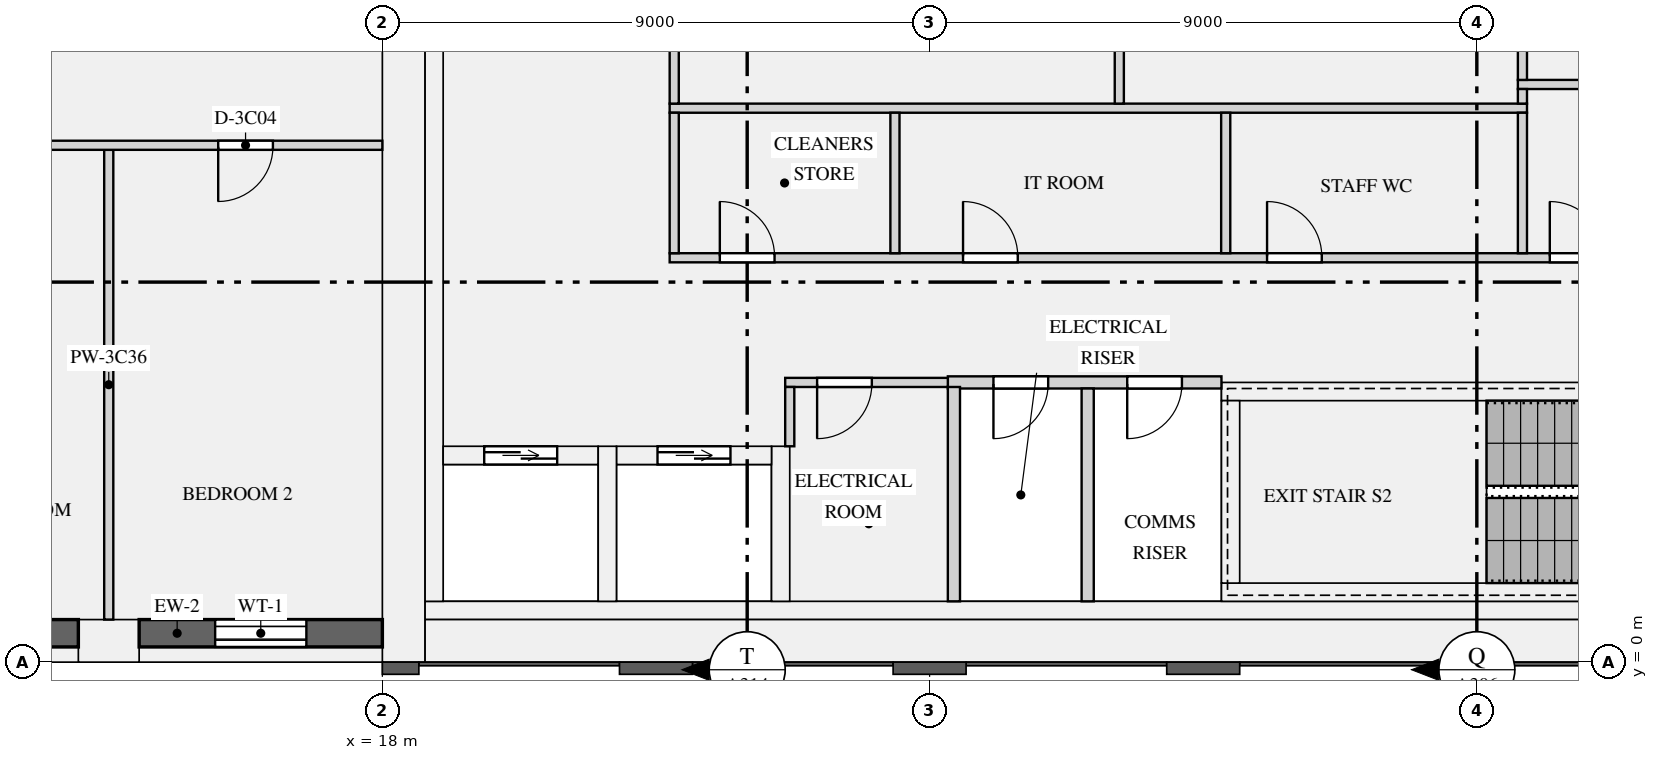
"""IFC4 building model, lengths in metres.
Left out: names, types, materials, properties, quantities, classifications, styles, units other than length and angle.
Written with IfcOpenShell. Run it as: python <this file> out.ifc"""

import sys

from ifc_helpers import new_model, si_unit, direction, frame, frame_2d, origin, origin_2d, place, context, subcontext, project, spatial, rectangle, extrude, element, fill, save


model = new_model("IFC4")
c1 = context("Model", 3, precision=1e-05, world=origin(), true_north=direction((0.0, 1.0)))
c2 = subcontext(c1, "Body", "Model", "MODEL_VIEW")
j1 = project(units=[si_unit("LENGTHUNIT", "METRE"), si_unit("PLANEANGLEUNIT", "RADIAN")], contexts=[c1])
p1 = place(None, origin())
s1 = spatial("IfcSite", under=j1, at=p1, CompositionType="ELEMENT")
p2 = place(p1, origin())
s2 = spatial("IfcBuilding", under=s1, at=p2, CompositionType="ELEMENT")
p3 = place(p2, frame((0.0, 0.0, 160.2)))
s3 = spatial("IfcBuildingStorey", under=s2, at=p3, CompositionType="ELEMENT", Elevation=160.2)
p4 = place(p3, frame((13.5, 0.35, 0.0), z_axis=(0.0, 0.0, 1.0), x_axis=(1.0, 0.0, 0.0)))
e1 = element("IfcColumn", 1, at=p4, inside=s3, PredefinedType="USERDEFINED", context=c2, shape_type="SweptSolid", body=[
    extrude(rectangle(XDim=1.0, YDim=0.7, at=origin_2d()), origin(), (0.0, 0.0, 1.0), 3.15),
])
p5 = place(p3, frame((18.35, 0.0, 0.0), z_axis=(0.0, 0.0, 1.0), x_axis=(0.0, 1.0, 0.0)))
e2 = element("IfcWall", 2, at=p5, inside=s3, PredefinedType="SHEAR", context=c2, shape_type="SweptSolid", body=[
    extrude(rectangle(XDim=12.5, YDim=0.7, at=frame_2d((6.25, 0.0))), origin(), (0.0, 0.0, 1.0), 3.15),
])
p6 = place(p3, frame((18.7, 0.35, 0.0), z_axis=(0.0, 0.0, 1.0), x_axis=(1.0, 0.0, 0.0)))
e3 = element("IfcWall", 3, at=p6, inside=s3, PredefinedType="SHEAR", context=c2, shape_type="SweptSolid", body=[
    extrude(rectangle(XDim=34.6, YDim=0.7, at=frame_2d((17.3, 0.0))), origin(), (0.0, 0.0, 1.0), 3.15),
])
p7 = place(p3, frame((18.85, 1.0, 0.0), z_axis=(0.0, 0.0, 1.0), x_axis=(0.0, 1.0, 0.0)))
e4 = element("IfcWall", 4, at=p7, inside=s3, PredefinedType="SHEAR", context=c2, shape_type="SweptSolid", body=[
    extrude(rectangle(XDim=10.9, YDim=0.3, at=frame_2d((5.45, 0.0))), origin(), (0.0, 0.0, 1.0), 3.15),
])
p8 = place(p3, frame((18.7, 0.85, 0.0), z_axis=(0.0, 0.0, 1.0), x_axis=(1.0, 0.0, 0.0)))
e5 = element("IfcWall", 5, at=p8, inside=s3, PredefinedType="SHEAR", context=c2, shape_type="SweptSolid", body=[
    extrude(rectangle(XDim=34.6, YDim=0.3, at=frame_2d((17.3, 0.0))), origin(), (0.0, 0.0, 1.0), 3.15),
])
p9 = place(p3, frame((19.0, 3.4, 0.0), z_axis=(0.0, 0.0, 1.0), x_axis=(1.0, 0.0, 0.0)))
e6 = element("IfcWall", 6, at=p9, inside=s3, PredefinedType="SHEAR", context=c2, shape_type="SweptSolid", body=[
    extrude(rectangle(XDim=2.55, YDim=0.3, at=frame_2d((1.275, 0.0))), origin(), (0.0, 0.0, 1.0), 3.15),
])
p10 = place(p9, frame((0.675, 0.0, 0.0)))
e7 = element("IfcOpeningElement", 7, at=p10, cuts=e6, PredefinedType="OPENING", context=c2, shape_type="SweptSolid", body=[
    extrude(rectangle(XDim=1.2, YDim=2.1, at=frame_2d((0.6, 1.05))), frame((0.0, 0.16, 0.0), z_axis=(0.0, -1.0, 0.0), x_axis=(1.0, 0.0, 0.0)), (0.0, 0.0, 1.0), 0.32),
])
p11 = place(p3, frame((21.85, 3.4, 0.0), z_axis=(0.0, 0.0, 1.0), x_axis=(1.0, 0.0, 0.0)))
e8 = element("IfcWall", 8, at=p11, inside=s3, PredefinedType="SHEAR", context=c2, shape_type="SweptSolid", body=[
    extrude(rectangle(XDim=2.55, YDim=0.3, at=frame_2d((1.275, 0.0))), origin(), (0.0, 0.0, 1.0), 3.15),
])
p12 = place(p11, frame((0.675, 0.0, 0.0)))
e9 = element("IfcOpeningElement", 9, at=p12, cuts=e8, PredefinedType="OPENING", context=c2, shape_type="SweptSolid", body=[
    extrude(rectangle(XDim=1.2, YDim=2.1, at=frame_2d((0.6, 1.05))), frame((0.0, 0.16, 0.0), z_axis=(0.0, -1.0, 0.0), x_axis=(1.0, 0.0, 0.0)), (0.0, 0.0, 1.0), 0.32),
])
for number, where, z_axis, x_axis in (
    (10, (21.7, 1.0, 0.0), (0.0, 0.0, 1.0), (0.0, 1.0, 0.0)),
    (11, (24.55, 1.0, 0.0), (0.0, 0.0, 1.0), (0.0, 1.0, 0.0)),
):
    element("IfcWall", number, at=place(p3, frame(where, z_axis=z_axis, x_axis=x_axis)), inside=s3, PredefinedType="SHEAR", context=c2, shape_type="SweptSolid", body=[
        extrude(rectangle(XDim=2.55, YDim=0.3, at=frame_2d((1.275, 0.0))), origin(), (0.0, 0.0, 1.0), 3.15),
    ])
p13 = place(p3, frame((31.8, 1.15, 0.0), z_axis=(0.0, 0.0, 1.0), x_axis=(1.0, 0.0, 0.0)))
e12 = element("IfcWall", 12, at=p13, inside=s3, PredefinedType="SHEAR", context=c2, shape_type="SweptSolid", body=[
    extrude(rectangle(XDim=8.4, YDim=0.3, at=frame_2d((4.2, 0.0))), origin(), (0.0, 0.0, 1.0), 3.15),
])
p14 = place(p3, frame((31.8, 4.45, 0.0), z_axis=(0.0, 0.0, 1.0), x_axis=(1.0, 0.0, 0.0)))
e13 = element("IfcWall", 13, at=p14, inside=s3, PredefinedType="SHEAR", context=c2, shape_type="SweptSolid", body=[
    extrude(rectangle(XDim=8.4, YDim=0.3, at=frame_2d((4.2, 0.0))), origin(), (0.0, 0.0, 1.0), 3.15),
])
p15 = place(p14, frame((6.8, 0.0, 0.0)))
e14 = element("IfcOpeningElement", 14, at=p15, cuts=e13, PredefinedType="OPENING", context=c2, shape_type="SweptSolid", body=[
    extrude(rectangle(XDim=1.1, YDim=2.1, at=frame_2d((0.55, 1.05))), frame((0.0, 0.16, 0.0), z_axis=(0.0, -1.0, 0.0), x_axis=(1.0, 0.0, 0.0)), (0.0, 0.0, 1.0), 0.32),
])
p16 = place(p3, frame((31.95, 1.3, 0.0), z_axis=(0.0, 0.0, 1.0), x_axis=(0.0, 1.0, 0.0)))
e15 = element("IfcWall", 15, at=p16, inside=s3, PredefinedType="SHEAR", context=c2, shape_type="SweptSolid", body=[
    extrude(rectangle(XDim=3.0, YDim=0.3, at=frame_2d((1.5, 0.0))), origin(), (0.0, 0.0, 1.0), 3.15),
])
p17 = place(p3, frame((10.0, 0.475, 0.9), z_axis=(0.0, 0.0, 1.0), x_axis=(1.0, 0.0, 0.0)))
e16 = element("IfcWall", 16, at=p17, inside=s3, PredefinedType="SOLIDWALL", context=c2, shape_type="SweptSolid", body=[
    extrude(rectangle(XDim=3.0, YDim=0.45, at=frame_2d((1.5, 0.0))), origin(), (0.0, 0.0, 1.0), 1.93),
])
p18 = place(p17, frame((0.75, 0.0, 0.15)))
e17 = element("IfcOpeningElement", 17, at=p18, cuts=e16, PredefinedType="OPENING", context=c2, shape_type="SweptSolid", body=[
    extrude(rectangle(XDim=1.5, YDim=1.5, at=frame_2d((0.75, 0.75))), frame((0.0, 0.235, 0.0), z_axis=(0.0, -1.0, 0.0), x_axis=(1.0, 0.0, 0.0)), (0.0, 0.0, 1.0), 0.47),
])
p19 = place(p3, frame((14.0, 0.475, 0.9), z_axis=(0.0, 0.0, 1.0), x_axis=(1.0, 0.0, 0.0)))
e18 = element("IfcWall", 18, at=p19, inside=s3, PredefinedType="SOLIDWALL", context=c2, shape_type="SweptSolid", body=[
    extrude(rectangle(XDim=4.0, YDim=0.45, at=frame_2d((2.0, 0.0))), origin(), (0.0, 0.0, 1.0), 1.93),
])
p20 = place(p19, frame((1.25, 0.0, 0.15)))
e19 = element("IfcOpeningElement", 19, at=p20, cuts=e18, PredefinedType="OPENING", context=c2, shape_type="SweptSolid", body=[
    extrude(rectangle(XDim=1.5, YDim=1.5, at=frame_2d((0.75, 0.75))), frame((0.0, 0.235, 0.0), z_axis=(0.0, -1.0, 0.0), x_axis=(1.0, 0.0, 0.0)), (0.0, 0.0, 1.0), 0.47),
])
p21 = place(p3, frame((27.3, 4.6, 0.0), z_axis=(0.0, 0.0, 1.0), x_axis=(1.0, 0.0, 0.0)))
e20 = element("IfcWall", 20, at=p21, inside=s3, PredefinedType="PARTITIONING", context=c2, shape_type="SweptSolid", body=[
    extrude(rectangle(XDim=4.5, YDim=0.2, at=frame_2d((2.25, 0.0))), origin(), (0.0, 0.0, 1.0), 2.83),
])
p22 = place(p21, frame((0.75, 0.0, 0.0)))
e21 = element("IfcOpeningElement", 21, at=p22, cuts=e20, PredefinedType="OPENING", context=c2, shape_type="SweptSolid", body=[
    extrude(rectangle(XDim=0.9, YDim=2.1, at=frame_2d((0.45, 1.05))), frame((0.0, 0.11, 0.0), z_axis=(0.0, -1.0, 0.0), x_axis=(1.0, 0.0, 0.0)), (0.0, 0.0, 1.0), 0.22),
])
p23 = place(p21, frame((2.95, 0.0, 0.0)))
e22 = element("IfcOpeningElement", 22, at=p23, cuts=e20, PredefinedType="OPENING", context=c2, shape_type="SweptSolid", body=[
    extrude(rectangle(XDim=0.9, YDim=2.1, at=frame_2d((0.45, 1.05))), frame((0.0, 0.11, 0.0), z_axis=(0.0, -1.0, 0.0), x_axis=(1.0, 0.0, 0.0)), (0.0, 0.0, 1.0), 0.22),
])
p24 = place(p3, frame((24.625, 4.6, 0.0), z_axis=(0.0, 0.0, 1.0), x_axis=(1.0, 0.0, 0.0)))
e23 = element("IfcWall", 23, at=p24, inside=s3, PredefinedType="PARTITIONING", context=c2, shape_type="SweptSolid", body=[
    extrude(rectangle(XDim=2.675, YDim=0.15, at=frame_2d((1.337, 0.0))), origin(), (0.0, 0.0, 1.0), 2.83),
])
p25 = place(p24, frame((0.525, 0.0, 0.0)))
e24 = element("IfcOpeningElement", 24, at=p25, cuts=e23, PredefinedType="OPENING", context=c2, shape_type="SweptSolid", body=[
    extrude(rectangle(XDim=0.9, YDim=2.1, at=frame_2d((0.45, 1.05))), frame((0.0, 0.085, 0.0), z_axis=(0.0, -1.0, 0.0), x_axis=(1.0, 0.0, 0.0)), (0.0, 0.0, 1.0), 0.17),
])
p26 = place(p3, frame((22.725, 6.65, 0.0), z_axis=(0.0, 0.0, 1.0), x_axis=(1.0, 0.0, 0.0)))
e25 = element("IfcWall", 25, at=p26, inside=s3, PredefinedType="PARTITIONING", context=c2, shape_type="SweptSolid", body=[
    extrude(rectangle(XDim=19.8, YDim=0.15, at=frame_2d((9.9, 0.0))), origin(), (0.0, 0.0, 1.0), 2.83),
])
p27 = place(p26, frame((0.825, 0.0, 0.0)))
e26 = element("IfcOpeningElement", 26, at=p27, cuts=e25, PredefinedType="OPENING", context=c2, shape_type="SweptSolid", body=[
    extrude(rectangle(XDim=0.9, YDim=2.1, at=frame_2d((0.45, 1.05))), frame((0.0, 0.085, 0.0), z_axis=(0.0, -1.0, 0.0), x_axis=(1.0, 0.0, 0.0)), (0.0, 0.0, 1.0), 0.17),
])
p28 = place(p26, frame((4.825, 0.0, 0.0)))
e27 = element("IfcOpeningElement", 27, at=p28, cuts=e25, PredefinedType="OPENING", context=c2, shape_type="SweptSolid", body=[
    extrude(rectangle(XDim=0.9, YDim=2.1, at=frame_2d((0.45, 1.05))), frame((0.0, 0.085, 0.0), z_axis=(0.0, -1.0, 0.0), x_axis=(1.0, 0.0, 0.0)), (0.0, 0.0, 1.0), 0.17),
])
p29 = place(p26, frame((9.825, 0.0, 0.0)))
e28 = element("IfcOpeningElement", 28, at=p29, cuts=e25, PredefinedType="OPENING", context=c2, shape_type="SweptSolid", body=[
    extrude(rectangle(XDim=0.9, YDim=2.1, at=frame_2d((0.45, 1.05))), frame((0.0, 0.085, 0.0), z_axis=(0.0, -1.0, 0.0), x_axis=(1.0, 0.0, 0.0)), (0.0, 0.0, 1.0), 0.17),
])
p30 = place(p26, frame((14.475, 0.0, 0.0)))
e29 = element("IfcOpeningElement", 29, at=p30, cuts=e25, PredefinedType="OPENING", context=c2, shape_type="SweptSolid", body=[
    extrude(rectangle(XDim=0.9, YDim=2.1, at=frame_2d((0.45, 1.05))), frame((0.0, 0.085, 0.0), z_axis=(0.0, -1.0, 0.0), x_axis=(1.0, 0.0, 0.0)), (0.0, 0.0, 1.0), 0.17),
])
p31 = place(p3, frame((22.725, 9.11, 0.0), z_axis=(0.0, 0.0, 1.0), x_axis=(1.0, 0.0, 0.0)))
e30 = element("IfcWall", 30, at=p31, inside=s3, PredefinedType="PARTITIONING", context=c2, shape_type="SweptSolid", body=[
    extrude(rectangle(XDim=14.1, YDim=0.15, at=frame_2d((7.05, 0.0))), origin(), (0.0, 0.0, 1.0), 2.83),
])
p32 = place(p3, frame((36.675, 9.5, 0.0), z_axis=(0.0, 0.0, 1.0), x_axis=(1.0, 0.0, 0.0)))
e31 = element("IfcWall", 31, at=p32, inside=s3, PredefinedType="PARTITIONING", context=c2, shape_type="SweptSolid", body=[
    extrude(rectangle(XDim=5.775, YDim=0.15, at=frame_2d((2.887, 0.0))), origin(), (0.0, 0.0, 1.0), 2.83),
])
p33 = place(p3, frame((27.4, 1.0, 0.0), z_axis=(0.0, 0.0, 1.0), x_axis=(0.0, 1.0, 0.0)))
e32 = element("IfcWall", 32, at=p33, inside=s3, PredefinedType="PARTITIONING", context=c2, shape_type="SweptSolid", body=[
    extrude(rectangle(XDim=3.525, YDim=0.2, at=frame_2d((1.762, 0.0))), origin(), (0.0, 0.0, 1.0), 2.83),
])
p34 = place(p3, frame((29.6, 1.0, 0.0), z_axis=(0.0, 0.0, 1.0), x_axis=(0.0, 1.0, 0.0)))
e33 = element("IfcWall", 33, at=p34, inside=s3, PredefinedType="PARTITIONING", context=c2, shape_type="SweptSolid", body=[
    extrude(rectangle(XDim=3.5, YDim=0.2, at=frame_2d((1.75, 0.0))), origin(), (0.0, 0.0, 1.0), 2.83),
])
p35 = place(p3, frame((24.7, 3.55, 0.0), z_axis=(0.0, 0.0, 1.0), x_axis=(0.0, 1.0, 0.0)))
e34 = element("IfcWall", 34, at=p35, inside=s3, PredefinedType="PARTITIONING", context=c2, shape_type="SweptSolid", body=[
    extrude(rectangle(XDim=0.975, YDim=0.15, at=frame_2d((0.487, 0.0))), origin(), (0.0, 0.0, 1.0), 2.83),
])
for number, where, z_axis, x_axis in (
    (35, (22.8, 6.725, 0.0), (0.0, 0.0, 1.0), (0.0, 1.0, 0.0)),
    (36, (26.43, 6.725, 0.0), (0.0, 0.0, 1.0), (0.0, 1.0, 0.0)),
    (37, (31.87, 6.725, 0.0), (0.0, 0.0, 1.0), (0.0, 1.0, 0.0)),
    (38, (36.75, 6.725, 0.0), (0.0, 0.0, 1.0), (0.0, 1.0, 0.0)),
):
    element("IfcWall", number, at=place(p3, frame(where, z_axis=z_axis, x_axis=x_axis)), inside=s3, PredefinedType="PARTITIONING", context=c2, shape_type="SweptSolid", body=[
        extrude(rectangle(XDim=2.31, YDim=0.15, at=frame_2d((1.155, 0.0))), origin(), (0.0, 0.0, 1.0), 2.83),
    ])
for number, where, z_axis, x_axis in (
    (39, (22.8, 9.185, 0.0), (0.0, 0.0, 1.0), (0.0, 1.0, 0.0)),
    (40, (30.12, 9.185, 0.0), (0.0, 0.0, 1.0), (0.0, 1.0, 0.0)),
):
    element("IfcWall", number, at=place(p3, frame(where, z_axis=z_axis, x_axis=x_axis)), inside=s3, PredefinedType="PARTITIONING", context=c2, shape_type="SweptSolid", body=[
        extrude(rectangle(XDim=2.715, YDim=0.15, at=frame_2d((1.357, 0.0))), origin(), (0.0, 0.0, 1.0), 2.83),
    ])
p36 = place(p3, frame((36.75, 9.185, 0.0), z_axis=(0.0, 0.0, 1.0), x_axis=(0.0, 1.0, 0.0)))
e41 = element("IfcWall", 41, at=p36, inside=s3, PredefinedType="PARTITIONING", context=c2, shape_type="SweptSolid", body=[
    extrude(rectangle(XDim=0.24, YDim=0.15, at=frame_2d((0.12, 0.0))), origin(), (0.0, 0.0, 1.0), 2.83),
])
p37 = place(p3, frame((36.75, 9.575, 0.0), z_axis=(0.0, 0.0, 1.0), x_axis=(0.0, 1.0, 0.0)))
e42 = element("IfcWall", 42, at=p37, inside=s3, PredefinedType="PARTITIONING", context=c2, shape_type="SweptSolid", body=[
    extrude(rectangle(XDim=2.325, YDim=0.15, at=frame_2d((1.163, 0.0))), origin(), (0.0, 0.0, 1.0), 2.83),
])
p38 = place(p3, frame((5.2, 8.5, 0.0), z_axis=(0.0, 0.0, 1.0), x_axis=(1.0, 0.0, 0.0)))
e43 = element("IfcWall", 43, at=p38, inside=s3, PredefinedType="PARTITIONING", context=c2, shape_type="SweptSolid", body=[
    extrude(rectangle(XDim=12.8, YDim=0.15, at=frame_2d((6.4, 0.0))), origin(), (0.0, 0.0, 1.0), 2.83),
])
p39 = place(p38, frame((10.1, 0.0, 0.0)))
e44 = element("IfcOpeningElement", 44, at=p39, cuts=e43, PredefinedType="OPENING", context=c2, shape_type="SweptSolid", body=[
    extrude(rectangle(XDim=0.9, YDim=2.1, at=frame_2d((0.45, 1.05))), frame((0.0, 0.085, 0.0), z_axis=(0.0, -1.0, 0.0), x_axis=(1.0, 0.0, 0.0)), (0.0, 0.0, 1.0), 0.17),
])
p40 = place(p38, frame((5.3, 0.0, 0.0)))
e45 = element("IfcOpeningElement", 45, at=p40, cuts=e43, PredefinedType="OPENING", context=c2, shape_type="SweptSolid", body=[
    extrude(rectangle(XDim=1.5, YDim=2.1, at=frame_2d((0.75, 1.05))), frame((0.0, 0.085, 0.0), z_axis=(0.0, -1.0, 0.0), x_axis=(1.0, 0.0, 0.0)), (0.0, 0.0, 1.0), 0.17),
])
p41 = place(p3, frame((13.5, 0.7, 0.0), z_axis=(0.0, 0.0, 1.0), x_axis=(0.0, 1.0, 0.0)))
e46 = element("IfcWall", 46, at=p41, inside=s3, PredefinedType="PARTITIONING", context=c2, shape_type="SweptSolid", body=[
    extrude(rectangle(XDim=7.725, YDim=0.15, at=frame_2d((3.863, 0.0))), origin(), (0.0, 0.0, 1.0), 2.83),
])
p42 = place(p20, origin())
e47 = element("IfcWindow", 47, at=p42, inside=s3, PartitioningType="SINGLE_PANEL", PredefinedType="WINDOW", context=c2, shape_type="SweptSolid", body=[
    extrude(rectangle(XDim=1.5, YDim=1.5, at=frame_2d((0.75, 0.75))), frame((0.0, -0.065, 0.0), z_axis=(0.0, -1.0, 0.0), x_axis=(1.0, 0.0, 0.0)), (0.0, 0.0, 1.0), 0.06),
])
fill(e19, e47)
p43 = place(p10, origin())
e48 = element("IfcDoor", 48, at=p43, inside=s3, OperationType="DOUBLE_DOOR_SLIDING", PredefinedType="DOOR", context=c2, shape_type="SweptSolid", body=[
    extrude(rectangle(XDim=1.2, YDim=2.1, at=frame_2d((0.6, 1.05))), frame((0.0, 0.025, 0.0), z_axis=(0.0, -1.0, 0.0), x_axis=(1.0, 0.0, 0.0)), (0.0, 0.0, 1.0), 0.05),
])
fill(e7, e48)
p44 = place(p12, origin())
e49 = element("IfcDoor", 49, at=p44, inside=s3, OperationType="DOUBLE_DOOR_SLIDING", PredefinedType="DOOR", context=c2, shape_type="SweptSolid", body=[
    extrude(rectangle(XDim=1.2, YDim=2.1, at=frame_2d((0.6, 1.05))), frame((0.0, 0.025, 0.0), z_axis=(0.0, -1.0, 0.0), x_axis=(1.0, 0.0, 0.0)), (0.0, 0.0, 1.0), 0.05),
])
fill(e9, e49)
p45 = place(p25, frame((0.9, 0.0, 0.0), z_axis=(0.0, 0.0, 1.0), x_axis=(-1.0, 0.0, 0.0)))
e50 = element("IfcDoor", 50, at=p45, inside=s3, OperationType="SINGLE_SWING_RIGHT", PredefinedType="DOOR", context=c2, shape_type="SweptSolid", body=[
    extrude(rectangle(XDim=0.9, YDim=2.1, at=frame_2d((0.45, 1.05))), frame((0.0, 0.025, 0.0), z_axis=(0.0, -1.0, 0.0), x_axis=(1.0, 0.0, 0.0)), (0.0, 0.0, 1.0), 0.05),
])
fill(e24, e50)
p46 = place(p27, origin())
e51 = element("IfcDoor", 51, at=p46, inside=s3, OperationType="SINGLE_SWING_LEFT", PredefinedType="DOOR", context=c2, shape_type="SweptSolid", body=[
    extrude(rectangle(XDim=0.9, YDim=2.1, at=frame_2d((0.45, 1.05))), frame((0.0, 0.025, 0.0), z_axis=(0.0, -1.0, 0.0), x_axis=(1.0, 0.0, 0.0)), (0.0, 0.0, 1.0), 0.05),
])
fill(e26, e51)
p47 = place(p28, origin())
e52 = element("IfcDoor", 52, at=p47, inside=s3, OperationType="SINGLE_SWING_LEFT", PredefinedType="DOOR", context=c2, shape_type="SweptSolid", body=[
    extrude(rectangle(XDim=0.9, YDim=2.1, at=frame_2d((0.45, 1.05))), frame((0.0, 0.025, 0.0), z_axis=(0.0, -1.0, 0.0), x_axis=(1.0, 0.0, 0.0)), (0.0, 0.0, 1.0), 0.05),
])
fill(e27, e52)
p48 = place(p29, origin())
e53 = element("IfcDoor", 53, at=p48, inside=s3, OperationType="SINGLE_SWING_LEFT", PredefinedType="DOOR", context=c2, shape_type="SweptSolid", body=[
    extrude(rectangle(XDim=0.9, YDim=2.1, at=frame_2d((0.45, 1.05))), frame((0.0, 0.025, 0.0), z_axis=(0.0, -1.0, 0.0), x_axis=(1.0, 0.0, 0.0)), (0.0, 0.0, 1.0), 0.05),
])
fill(e28, e53)
p49 = place(p30, origin())
e54 = element("IfcDoor", 54, at=p49, inside=s3, OperationType="SINGLE_SWING_LEFT", PredefinedType="DOOR", context=c2, shape_type="SweptSolid", body=[
    extrude(rectangle(XDim=0.9, YDim=2.1, at=frame_2d((0.45, 1.05))), frame((0.0, 0.025, 0.0), z_axis=(0.0, -1.0, 0.0), x_axis=(1.0, 0.0, 0.0)), (0.0, 0.0, 1.0), 0.05),
])
fill(e29, e54)
p50 = place(p22, frame((0.9, 0.0, 0.0), z_axis=(0.0, 0.0, 1.0), x_axis=(-1.0, 0.0, 0.0)))
e55 = element("IfcDoor", 55, at=p50, inside=s3, OperationType="SINGLE_SWING_RIGHT", PredefinedType="DOOR", context=c2, shape_type="SweptSolid", body=[
    extrude(rectangle(XDim=0.9, YDim=2.1, at=frame_2d((0.45, 1.05))), frame((0.0, 0.025, 0.0), z_axis=(0.0, -1.0, 0.0), x_axis=(1.0, 0.0, 0.0)), (0.0, 0.0, 1.0), 0.05),
])
fill(e21, e55)
p51 = place(p23, frame((0.9, 0.0, 0.0), z_axis=(0.0, 0.0, 1.0), x_axis=(-1.0, 0.0, 0.0)))
e56 = element("IfcDoor", 56, at=p51, inside=s3, OperationType="SINGLE_SWING_RIGHT", PredefinedType="DOOR", context=c2, shape_type="SweptSolid", body=[
    extrude(rectangle(XDim=0.9, YDim=2.1, at=frame_2d((0.45, 1.05))), frame((0.0, 0.025, 0.0), z_axis=(0.0, -1.0, 0.0), x_axis=(1.0, 0.0, 0.0)), (0.0, 0.0, 1.0), 0.05),
])
fill(e22, e56)
p52 = place(p39, frame((0.9, 0.0, 0.0), z_axis=(0.0, 0.0, 1.0), x_axis=(-1.0, 0.0, 0.0)))
e57 = element("IfcDoor", 57, at=p52, inside=s3, OperationType="SINGLE_SWING_RIGHT", PredefinedType="DOOR", context=c2, shape_type="SweptSolid", body=[
    extrude(rectangle(XDim=0.9, YDim=2.1, at=frame_2d((0.45, 1.05))), frame((0.0, 0.025, 0.0), z_axis=(0.0, -1.0, 0.0), x_axis=(1.0, 0.0, 0.0)), (0.0, 0.0, 1.0), 0.05),
])
fill(e44, e57)
save(model, sys.argv[1])
